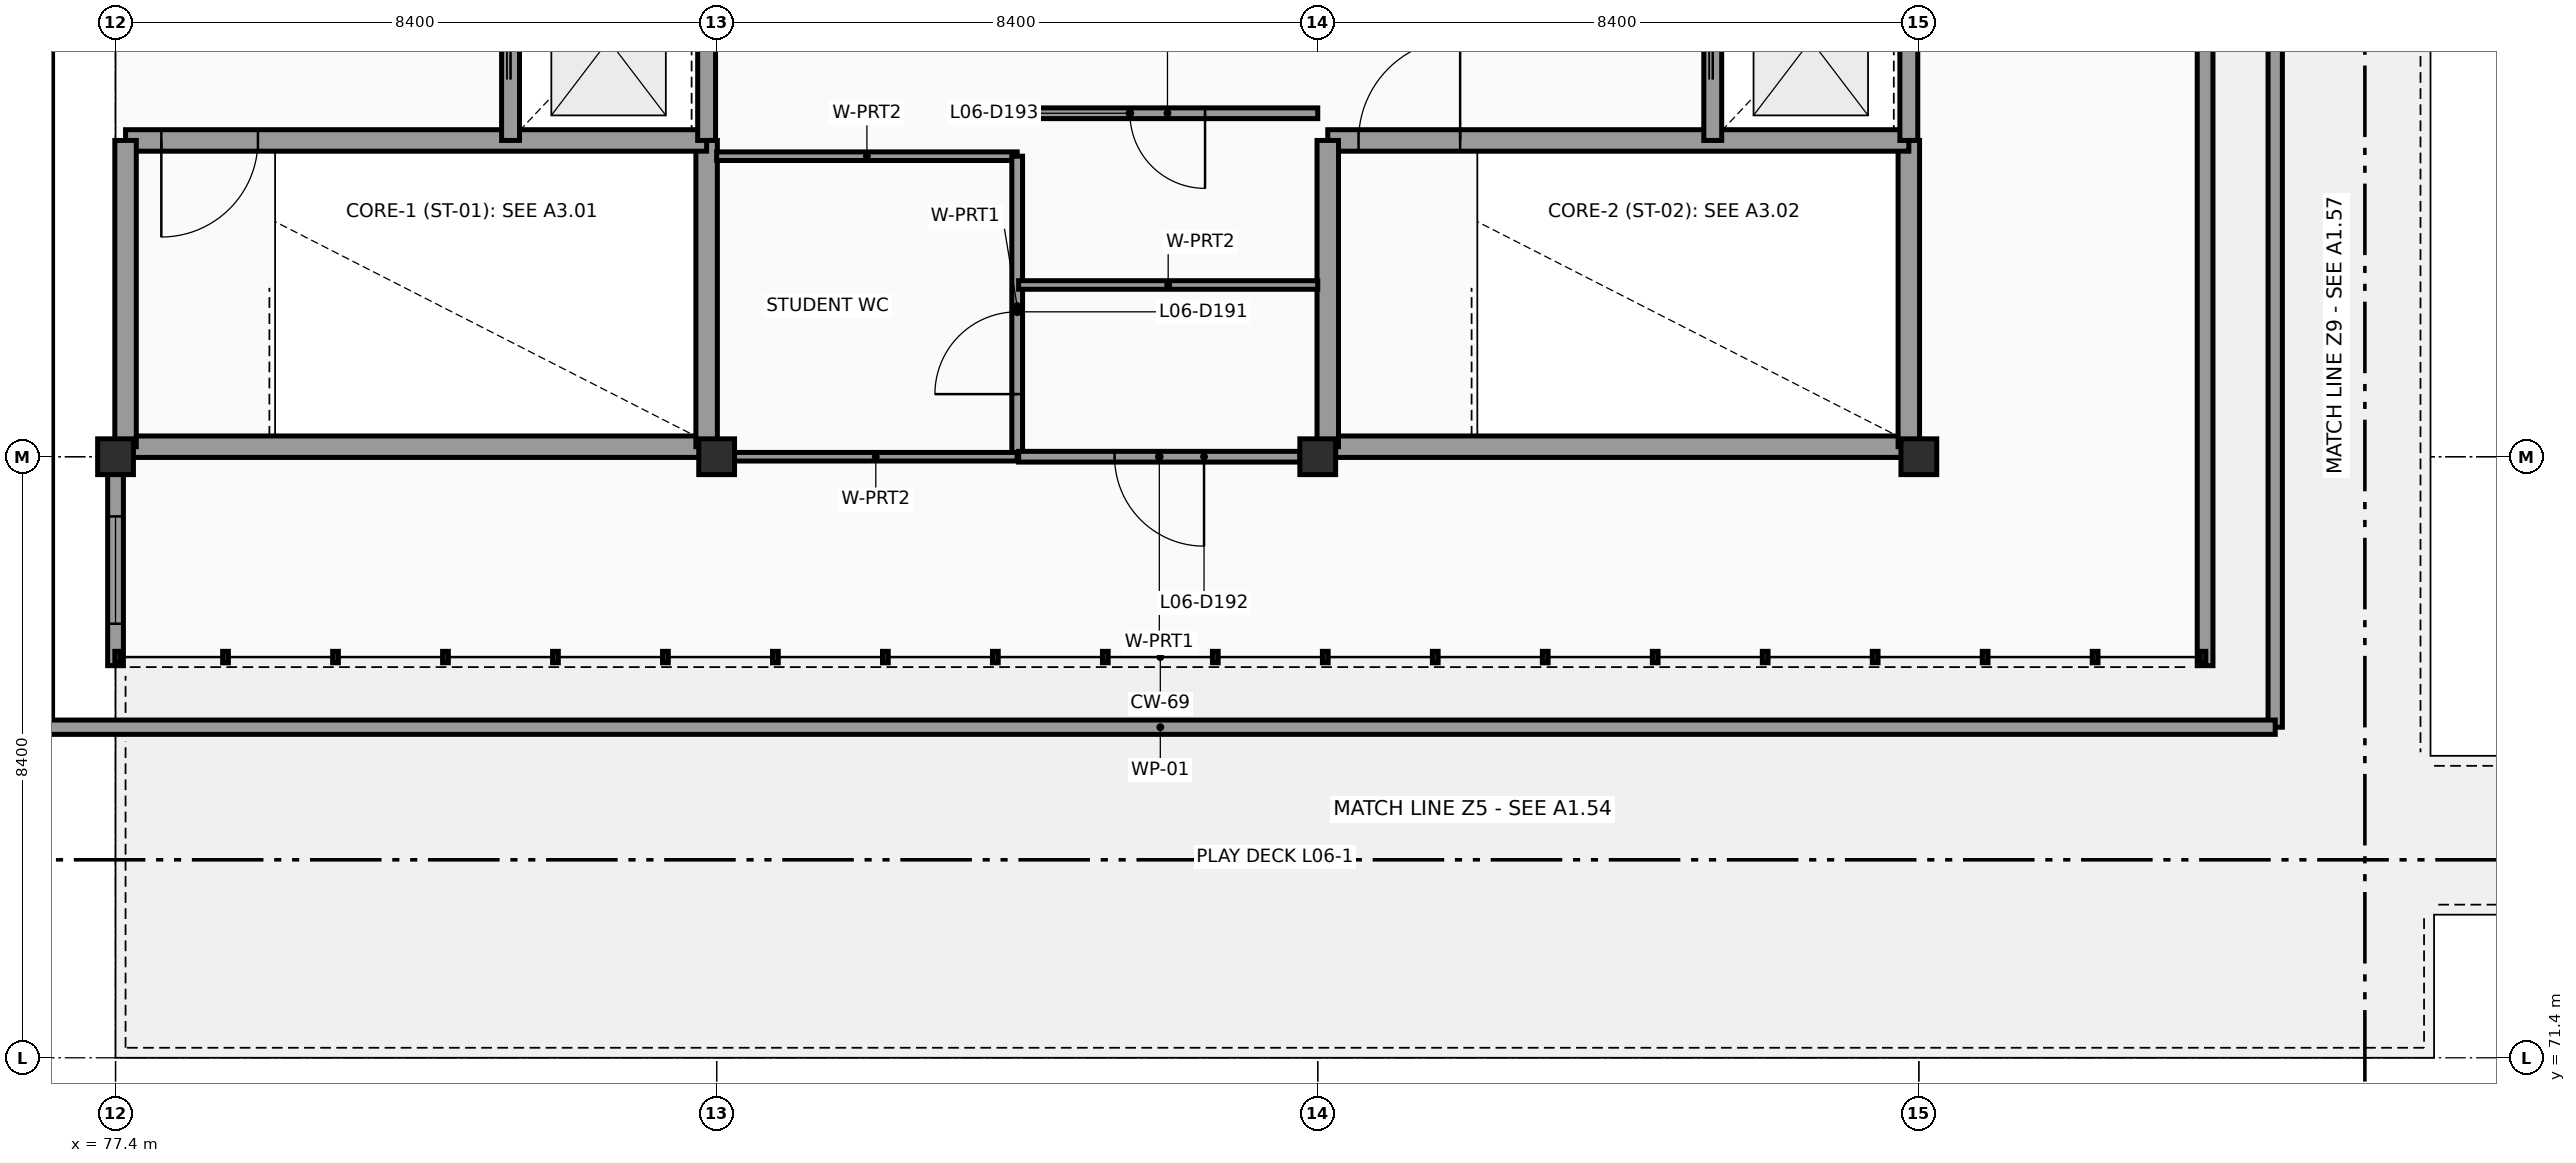
"""IFC4 building model, lengths in metres.
Left out: names, types, materials, properties, quantities, classifications, styles, units other than length and angle.
Written with IfcOpenShell. Run it as: python <this file> out.ifc"""

import sys

from ifc_helpers import new_model, si_unit, direction, frame, frame_2d, origin, origin_2d, place, context, subcontext, project, spatial, rectangle, extrude, element, fill, save


model = new_model("IFC4")
c1 = context("Model", 3, precision=1e-05, world=origin(), true_north=direction((0.0, 1.0)))
c2 = subcontext(c1, "Body", "Model", "MODEL_VIEW")
j1 = project(units=[si_unit("LENGTHUNIT", "METRE"), si_unit("PLANEANGLEUNIT", "RADIAN")], contexts=[c1])
p1 = place(None, origin())
s1 = spatial("IfcSite", under=j1, at=p1, CompositionType="ELEMENT")
p2 = place(p1, origin())
s2 = spatial("IfcBuilding", under=s1, at=p2, CompositionType="ELEMENT")
p3 = place(p2, frame((0.0, 0.0, 22.2)))
s3 = spatial("IfcBuildingStorey", under=s2, at=p3, CompositionType="ELEMENT", Elevation=22.2)
for number, where, z_axis, x_axis in (
    (1, (77.4, 79.8, 0.0), (0.0, 0.0, 1.0), (1.0, 0.0, 0.0)),
    (2, (85.8, 79.8, 0.0), (0.0, 0.0, 1.0), (1.0, 0.0, 0.0)),
    (3, (94.2, 79.8, 0.0), (0.0, 0.0, 1.0), (1.0, 0.0, 0.0)),
    (4, (102.6, 79.8, 0.0), (0.0, 0.0, 1.0), (1.0, 0.0, 0.0)),
):
    element("IfcColumn", number, at=place(p3, frame(where, z_axis=z_axis, x_axis=x_axis)), inside=s3, PredefinedType="COLUMN", context=c2, shape_type="SweptSolid", body=[
        extrude(rectangle(XDim=0.5, YDim=0.5, at=origin_2d()), origin(), (0.0, 0.0, 1.0), 3.38),
    ])
p4 = place(p3, frame((106.6, 96.72, 0.0), z_axis=(0.0, 0.0, 1.0), x_axis=(0.0, -1.0, 0.0)))
e5 = element("IfcWall", 5, at=p4, inside=s3, PredefinedType="SOLIDWALL", context=c2, shape_type="SweptSolid", body=[
    extrude(rectangle(XDim=19.84, YDim=0.22, at=frame_2d((9.92, 0.0))), origin(), (0.0, 0.0, 1.0), 3.38),
])
p5 = place(p4, frame((9.32, 0.0, 0.0)))
e6 = element("IfcOpeningElement", 6, at=p5, cuts=e5, PredefinedType="OPENING", context=c2, shape_type="SweptSolid", body=[
    extrude(rectangle(XDim=1.2, YDim=2.15, at=frame_2d((0.6, 1.075))), frame((0.0, 0.12, 0.0), z_axis=(0.0, -1.0, 0.0), x_axis=(1.0, 0.0, 0.0)), (0.0, 0.0, 1.0), 0.24),
])
p6 = place(p3, frame((77.4, 76.88, 0.0), z_axis=(0.0, 0.0, 1.0), x_axis=(0.0, 1.0, 0.0)))
e7 = element("IfcWall", 7, at=p6, inside=s3, PredefinedType="SOLIDWALL", context=c2, shape_type="SweptSolid", body=[
    extrude(rectangle(XDim=2.672, YDim=0.22, at=frame_2d((1.336, 0.0))), origin(), (0.0, 0.0, 1.0), 3.38),
])
p7 = place(p6, frame((0.586, 0.0, 0.95)))
e8 = element("IfcOpeningElement", 8, at=p7, cuts=e7, PredefinedType="OPENING", context=c2, shape_type="SweptSolid", body=[
    extrude(rectangle(XDim=1.5, YDim=1.2, at=frame_2d((0.75, 0.6))), frame((0.0, 0.12, 0.0), z_axis=(0.0, -1.0, 0.0), x_axis=(1.0, 0.0, 0.0)), (0.0, 0.0, 1.0), 0.24),
])
p8 = place(p3, frame((107.58, 97.58, 3.6), z_axis=(0.0, 0.0, 1.0), x_axis=(0.0, -1.0, 0.0)))
e9 = element("IfcWall", 9, at=p8, inside=s3, PredefinedType="PARAPET", context=c2, shape_type="SweptSolid", body=[
    extrude(rectangle(XDim=21.56, YDim=0.2, at=frame_2d((10.78, 0.0))), origin(), (0.0, 0.0, 1.0), 1.1),
])
p9 = place(p3, frame((107.58, 76.02, 3.6), z_axis=(0.0, 0.0, 1.0), x_axis=(-1.0, 0.0, 0.0)))
e10 = element("IfcWall", 10, at=p9, inside=s3, PredefinedType="PARAPET", context=c2, shape_type="SweptSolid", body=[
    extrude(rectangle(XDim=31.16, YDim=0.2, at=frame_2d((15.58, 0.0))), origin(), (0.0, 0.0, 1.0), 1.1),
])
p10 = place(p3, frame((77.54, 79.94, 0.0), z_axis=(0.0, 0.0, 1.0), x_axis=(1.0, 0.0, 0.0)))
e11 = element("IfcWall", 11, at=p10, inside=s3, PredefinedType="SHEAR", context=c2, shape_type="SweptSolid", body=[
    extrude(rectangle(XDim=8.12, YDim=0.3, at=frame_2d((4.06, 0.0))), origin(), (0.0, 0.0, 1.0), 3.38),
])
p11 = place(p3, frame((85.66, 79.94, 0.0), z_axis=(0.0, 0.0, 1.0), x_axis=(0.0, 1.0, 0.0)))
e12 = element("IfcWall", 12, at=p11, inside=s3, PredefinedType="SHEAR", context=c2, shape_type="SweptSolid", body=[
    extrude(rectangle(XDim=4.28, YDim=0.3, at=frame_2d((2.14, 0.0))), origin(), (0.0, 0.0, 1.0), 3.38),
])
p12 = place(p3, frame((85.66, 84.22, 0.0), z_axis=(0.0, 0.0, 1.0), x_axis=(-1.0, 0.0, 0.0)))
e13 = element("IfcWall", 13, at=p12, inside=s3, PredefinedType="SHEAR", context=c2, shape_type="SweptSolid", body=[
    extrude(rectangle(XDim=8.12, YDim=0.3, at=frame_2d((4.06, 0.0))), origin(), (0.0, 0.0, 1.0), 3.38),
])
p13 = place(p12, frame((6.27, 0.0, 0.0)))
e14 = element("IfcOpeningElement", 14, at=p13, cuts=e13, PredefinedType="OPENING", context=c2, shape_type="SweptSolid", body=[
    extrude(rectangle(XDim=1.35, YDim=2.15, at=frame_2d((0.675, 1.075))), frame((0.0, 0.16, 0.0), z_axis=(0.0, -1.0, 0.0), x_axis=(1.0, 0.0, 0.0)), (0.0, 0.0, 1.0), 0.32),
])
p14 = place(p3, frame((77.54, 84.22, 0.0), z_axis=(0.0, 0.0, 1.0), x_axis=(0.0, -1.0, 0.0)))
e15 = element("IfcWall", 15, at=p14, inside=s3, PredefinedType="SHEAR", context=c2, shape_type="SweptSolid", body=[
    extrude(rectangle(XDim=4.28, YDim=0.3, at=frame_2d((2.14, 0.0))), origin(), (0.0, 0.0, 1.0), 3.38),
])
p15 = place(p3, frame((82.92, 87.02, 0.0), z_axis=(0.0, 0.0, 1.0), x_axis=(0.0, -1.0, 0.0)))
e16 = element("IfcWall", 16, at=p15, inside=s3, PredefinedType="SHEAR", context=c2, shape_type="SweptSolid", body=[
    extrude(rectangle(XDim=2.8, YDim=0.25, at=frame_2d((1.4, 0.0))), origin(), (0.0, 0.0, 1.0), 3.38),
])
p16 = place(p15, frame((0.85, 0.0, 0.0)))
e17 = element("IfcOpeningElement", 17, at=p16, cuts=e16, PredefinedType="OPENING", context=c2, shape_type="SweptSolid", body=[
    extrude(rectangle(XDim=1.1, YDim=2.15, at=frame_2d((0.55, 1.075))), frame((0.0, 0.135, 0.0), z_axis=(0.0, -1.0, 0.0), x_axis=(1.0, 0.0, 0.0)), (0.0, 0.0, 1.0), 0.27),
])
p17 = place(p3, frame((85.66, 84.22, 0.0), z_axis=(0.0, 0.0, 1.0), x_axis=(0.0, 1.0, 0.0)))
e18 = element("IfcWall", 18, at=p17, inside=s3, PredefinedType="SHEAR", context=c2, shape_type="SweptSolid", body=[
    extrude(rectangle(XDim=2.8, YDim=0.25, at=frame_2d((1.4, 0.0))), origin(), (0.0, 0.0, 1.0), 3.38),
])
p18 = place(p3, frame((94.34, 79.94, 0.0), z_axis=(0.0, 0.0, 1.0), x_axis=(1.0, 0.0, 0.0)))
e19 = element("IfcWall", 19, at=p18, inside=s3, PredefinedType="SHEAR", context=c2, shape_type="SweptSolid", body=[
    extrude(rectangle(XDim=8.12, YDim=0.3, at=frame_2d((4.06, 0.0))), origin(), (0.0, 0.0, 1.0), 3.38),
])
p19 = place(p3, frame((102.46, 79.94, 0.0), z_axis=(0.0, 0.0, 1.0), x_axis=(0.0, 1.0, 0.0)))
e20 = element("IfcWall", 20, at=p19, inside=s3, PredefinedType="SHEAR", context=c2, shape_type="SweptSolid", body=[
    extrude(rectangle(XDim=4.28, YDim=0.3, at=frame_2d((2.14, 0.0))), origin(), (0.0, 0.0, 1.0), 3.38),
])
p20 = place(p3, frame((102.46, 84.22, 0.0), z_axis=(0.0, 0.0, 1.0), x_axis=(-1.0, 0.0, 0.0)))
e21 = element("IfcWall", 21, at=p20, inside=s3, PredefinedType="SHEAR", context=c2, shape_type="SweptSolid", body=[
    extrude(rectangle(XDim=8.12, YDim=0.3, at=frame_2d((4.06, 0.0))), origin(), (0.0, 0.0, 1.0), 3.38),
])
p21 = place(p20, frame((6.27, 0.0, 0.0)))
e22 = element("IfcOpeningElement", 22, at=p21, cuts=e21, PredefinedType="OPENING", context=c2, shape_type="SweptSolid", body=[
    extrude(rectangle(XDim=1.42, YDim=2.15, at=frame_2d((0.71, 1.075))), frame((0.0, 0.16, 0.0), z_axis=(0.0, -1.0, 0.0), x_axis=(1.0, 0.0, 0.0)), (0.0, 0.0, 1.0), 0.32),
])
p22 = place(p3, frame((94.34, 84.22, 0.0), z_axis=(0.0, 0.0, 1.0), x_axis=(0.0, -1.0, 0.0)))
e23 = element("IfcWall", 23, at=p22, inside=s3, PredefinedType="SHEAR", context=c2, shape_type="SweptSolid", body=[
    extrude(rectangle(XDim=4.28, YDim=0.3, at=frame_2d((2.14, 0.0))), origin(), (0.0, 0.0, 1.0), 3.38),
])
p23 = place(p3, frame((99.72, 87.02, 0.0), z_axis=(0.0, 0.0, 1.0), x_axis=(0.0, -1.0, 0.0)))
e24 = element("IfcWall", 24, at=p23, inside=s3, PredefinedType="SHEAR", context=c2, shape_type="SweptSolid", body=[
    extrude(rectangle(XDim=2.8, YDim=0.25, at=frame_2d((1.4, 0.0))), origin(), (0.0, 0.0, 1.0), 3.38),
])
p24 = place(p23, frame((0.85, 0.0, 0.0)))
e25 = element("IfcOpeningElement", 25, at=p24, cuts=e24, PredefinedType="OPENING", context=c2, shape_type="SweptSolid", body=[
    extrude(rectangle(XDim=1.1, YDim=2.15, at=frame_2d((0.55, 1.075))), frame((0.0, 0.135, 0.0), z_axis=(0.0, -1.0, 0.0), x_axis=(1.0, 0.0, 0.0)), (0.0, 0.0, 1.0), 0.27),
])
p25 = place(p3, frame((102.46, 84.22, 0.0), z_axis=(0.0, 0.0, 1.0), x_axis=(0.0, 1.0, 0.0)))
e26 = element("IfcWall", 26, at=p25, inside=s3, PredefinedType="SHEAR", context=c2, shape_type="SweptSolid", body=[
    extrude(rectangle(XDim=2.8, YDim=0.25, at=frame_2d((1.4, 0.0))), origin(), (0.0, 0.0, 1.0), 3.38),
])
p26 = place(p3, frame((85.8, 84.0, 0.0), z_axis=(0.0, 0.0, 1.0), x_axis=(1.0, 0.0, 0.0)))
e27 = element("IfcWall", 27, at=p26, inside=s3, PredefinedType="PARTITIONING", context=c2, shape_type="SweptSolid", body=[
    extrude(rectangle(XDim=4.2, YDim=0.12, at=frame_2d((2.1, 0.0))), origin(), (0.0, 0.0, 1.0), 3.02),
])
p27 = place(p3, frame((90.0, 84.0, 0.0), z_axis=(0.0, 0.0, 1.0), x_axis=(0.0, -1.0, 0.0)))
e28 = element("IfcWall", 28, at=p27, inside=s3, PredefinedType="PARTITIONING", context=c2, shape_type="SweptSolid", body=[
    extrude(rectangle(XDim=4.2, YDim=0.15, at=frame_2d((2.1, 0.0))), origin(), (0.0, 0.0, 1.0), 2.88),
])
p28 = place(p27, frame((2.175, 0.0, 0.0)))
e29 = element("IfcOpeningElement", 29, at=p28, cuts=e28, PredefinedType="OPENING", context=c2, shape_type="SweptSolid", body=[
    extrude(rectangle(XDim=1.15, YDim=2.15, at=frame_2d((0.575, 1.075))), frame((0.0, 0.085, 0.0), z_axis=(0.0, -1.0, 0.0), x_axis=(1.0, 0.0, 0.0)), (0.0, 0.0, 1.0), 0.17),
])
p29 = place(p3, frame((90.0, 79.8, 0.0), z_axis=(0.0, 0.0, 1.0), x_axis=(-1.0, 0.0, 0.0)))
e30 = element("IfcWall", 30, at=p29, inside=s3, PredefinedType="PARTITIONING", context=c2, shape_type="SweptSolid", body=[
    extrude(rectangle(XDim=3.952, YDim=0.12, at=frame_2d((1.976, 0.0))), origin(), (0.0, 0.0, 1.0), 2.93),
])
p30 = place(p3, frame((93.952, 79.8, 0.0), z_axis=(0.0, 0.0, 1.0), x_axis=(-1.0, 0.0, 0.0)))
e31 = element("IfcWall", 31, at=p30, inside=s3, PredefinedType="PARTITIONING", context=c2, shape_type="SweptSolid", body=[
    extrude(rectangle(XDim=3.932, YDim=0.15, at=frame_2d((1.966, 0.0))), origin(), (0.0, 0.0, 1.0), 2.93),
])
p31 = place(p30, frame((1.341, 0.0, 0.0)))
e32 = element("IfcOpeningElement", 32, at=p31, cuts=e31, PredefinedType="OPENING", context=c2, shape_type="SweptSolid", body=[
    extrude(rectangle(XDim=1.25, YDim=2.15, at=frame_2d((0.625, 1.075))), frame((0.0, 0.085, 0.0), z_axis=(0.0, -1.0, 0.0), x_axis=(1.0, 0.0, 0.0)), (0.0, 0.0, 1.0), 0.17),
])
p32 = place(p3, frame((90.02, 82.2, 0.0), z_axis=(0.0, 0.0, 1.0), x_axis=(1.0, 0.0, 0.0)))
e33 = element("IfcWall", 33, at=p32, inside=s3, PredefinedType="PARTITIONING", context=c2, shape_type="SweptSolid", body=[
    extrude(rectangle(XDim=4.18, YDim=0.12, at=frame_2d((2.09, 0.0))), origin(), (0.0, 0.0, 1.0), 2.73),
])
p33 = place(p3, frame((90.0, 84.6, 0.0), z_axis=(0.0, 0.0, 1.0), x_axis=(1.0, 0.0, 0.0)))
e34 = element("IfcWall", 34, at=p33, inside=s3, PredefinedType="PARTITIONING", context=c2, shape_type="SweptSolid", body=[
    extrude(rectangle(XDim=4.2, YDim=0.15, at=frame_2d((2.1, 0.0))), origin(), (0.0, 0.0, 1.0), 2.73),
])
p34 = place(p33, frame((1.575, 0.0, 0.0)))
e35 = element("IfcOpeningElement", 35, at=p34, cuts=e34, PredefinedType="OPENING", context=c2, shape_type="SweptSolid", body=[
    extrude(rectangle(XDim=1.05, YDim=2.15, at=frame_2d((0.525, 1.075))), frame((0.0, 0.085, 0.0), z_axis=(0.0, -1.0, 0.0), x_axis=(1.0, 0.0, 0.0)), (0.0, 0.0, 1.0), 0.17),
])
p35 = place(p7, origin())
e36 = element("IfcWindow", 36, at=p35, inside=s3, PartitioningType="SINGLE_PANEL", PredefinedType="WINDOW", context=c2, shape_type="SweptSolid", body=[
    extrude(rectangle(XDim=1.5, YDim=1.2, at=frame_2d((0.75, 0.6))), frame((0.0, 0.03, 0.0), z_axis=(0.0, -1.0, 0.0), x_axis=(1.0, 0.0, 0.0)), (0.0, 0.0, 1.0), 0.06),
])
fill(e8, e36)
p36 = place(p13, frame((1.35, 0.0, 0.0), z_axis=(0.0, 0.0, 1.0), x_axis=(-1.0, 0.0, 0.0)))
e37 = element("IfcDoor", 37, at=p36, inside=s3, OperationType="SINGLE_SWING_RIGHT", PredefinedType="DOOR", context=c2, shape_type="SweptSolid", body=[
    extrude(rectangle(XDim=1.35, YDim=2.15, at=frame_2d((0.675, 1.075))), frame((0.0, 0.025, 0.0), z_axis=(0.0, -1.0, 0.0), x_axis=(1.0, 0.0, 0.0)), (0.0, 0.0, 1.0), 0.05),
])
fill(e14, e37)
p37 = place(p16, origin())
e38 = element("IfcDoor", 38, at=p37, inside=s3, OperationType="DOUBLE_DOOR_SLIDING", PredefinedType="DOOR", context=c2, shape_type="SweptSolid", body=[
    extrude(rectangle(XDim=1.1, YDim=2.15, at=frame_2d((0.55, 1.075))), frame((0.0, 0.025, 0.0), z_axis=(0.0, -1.0, 0.0), x_axis=(1.0, 0.0, 0.0)), (0.0, 0.0, 1.0), 0.05),
])
fill(e17, e38)
p38 = place(p21, frame((1.42, 0.0, 0.0), z_axis=(0.0, 0.0, 1.0), x_axis=(-1.0, 0.0, 0.0)))
e39 = element("IfcDoor", 39, at=p38, inside=s3, OperationType="SINGLE_SWING_LEFT", PredefinedType="DOOR", context=c2, shape_type="SweptSolid", body=[
    extrude(rectangle(XDim=1.42, YDim=2.15, at=frame_2d((0.71, 1.075))), frame((0.0, 0.025, 0.0), z_axis=(0.0, -1.0, 0.0), x_axis=(1.0, 0.0, 0.0)), (0.0, 0.0, 1.0), 0.05),
])
fill(e22, e39)
p39 = place(p24, origin())
e40 = element("IfcDoor", 40, at=p39, inside=s3, OperationType="DOUBLE_DOOR_SLIDING", PredefinedType="DOOR", context=c2, shape_type="SweptSolid", body=[
    extrude(rectangle(XDim=1.1, YDim=2.15, at=frame_2d((0.55, 1.075))), frame((0.0, 0.025, 0.0), z_axis=(0.0, -1.0, 0.0), x_axis=(1.0, 0.0, 0.0)), (0.0, 0.0, 1.0), 0.05),
])
fill(e25, e40)
p40 = place(p28, origin())
e41 = element("IfcDoor", 41, at=p40, inside=s3, OperationType="SINGLE_SWING_RIGHT", PredefinedType="DOOR", context=c2, shape_type="SweptSolid", body=[
    extrude(rectangle(XDim=1.15, YDim=2.15, at=frame_2d((0.575, 1.075))), frame((0.0, 0.025, 0.0), z_axis=(0.0, -1.0, 0.0), x_axis=(1.0, 0.0, 0.0)), (0.0, 0.0, 1.0), 0.05),
])
fill(e29, e41)
p41 = place(p31, origin())
e42 = element("IfcDoor", 42, at=p41, inside=s3, OperationType="SINGLE_SWING_LEFT", PredefinedType="DOOR", context=c2, shape_type="SweptSolid", body=[
    extrude(rectangle(XDim=1.25, YDim=2.15, at=frame_2d((0.625, 1.075))), frame((0.0, 0.025, 0.0), z_axis=(0.0, -1.0, 0.0), x_axis=(1.0, 0.0, 0.0)), (0.0, 0.0, 1.0), 0.05),
])
fill(e32, e42)
p42 = place(p34, origin())
e43 = element("IfcDoor", 43, at=p42, inside=s3, OperationType="SINGLE_SWING_RIGHT", PredefinedType="DOOR", context=c2, shape_type="SweptSolid", body=[
    extrude(rectangle(XDim=1.05, YDim=2.15, at=frame_2d((0.525, 1.075))), frame((0.0, 0.025, 0.0), z_axis=(0.0, -1.0, 0.0), x_axis=(1.0, 0.0, 0.0)), (0.0, 0.0, 1.0), 0.05),
])
fill(e35, e43)
save(model, sys.argv[1])
